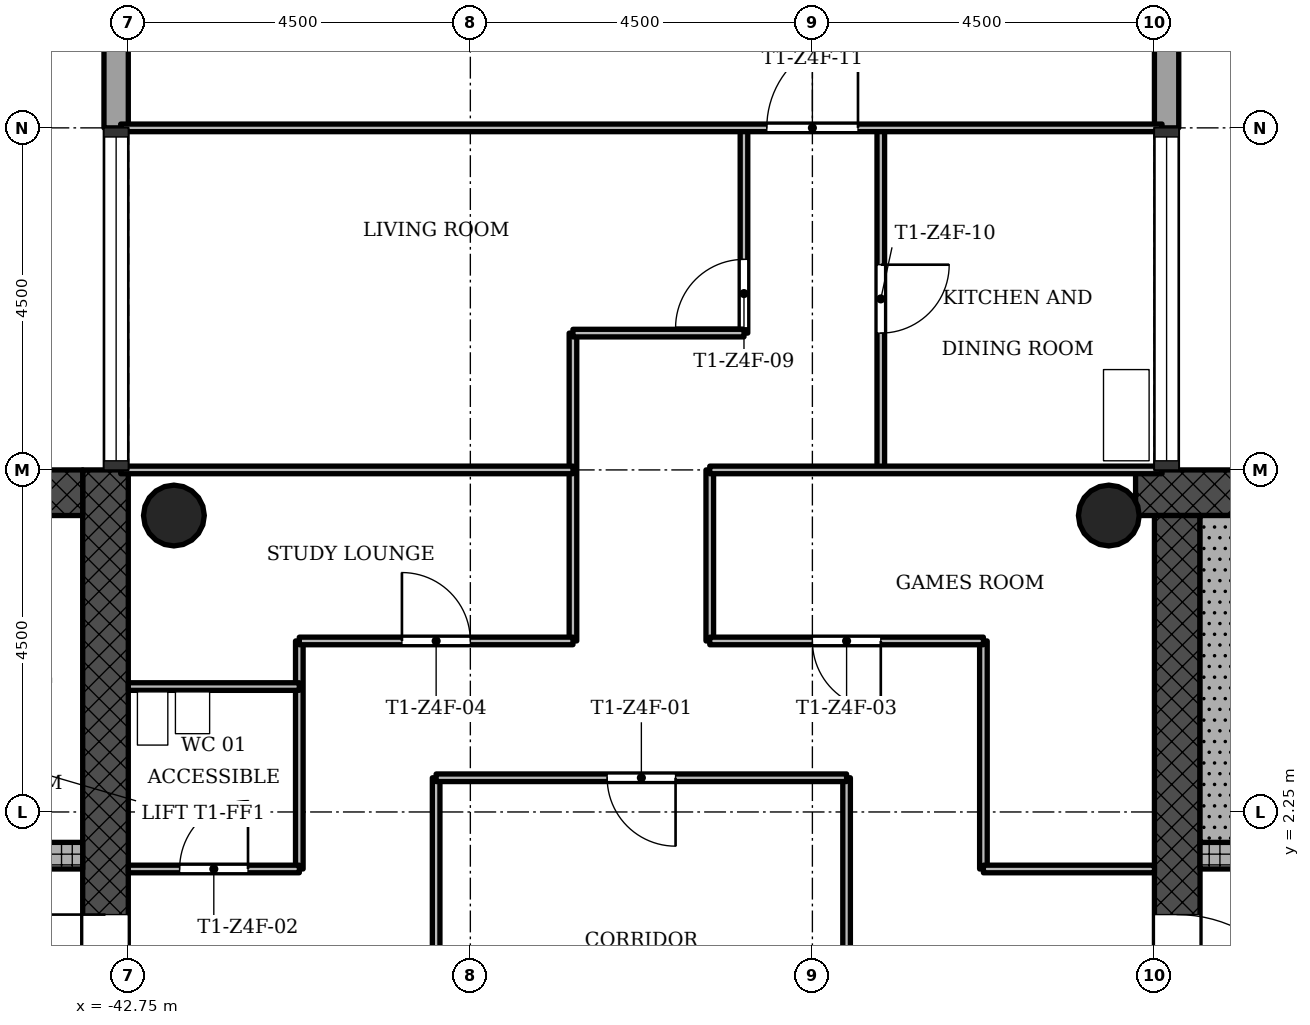
"""IFC4 building model, lengths in metres.
Left out: names, types, materials, properties, quantities, classifications, styles, units other than length and angle.
Written with IfcOpenShell. Run it as: python <this file> out.ifc"""

import sys

from ifc_helpers import new_model, si_unit, direction, frame, frame_2d, origin, origin_2d, place, context, subcontext, project, spatial, rectangle, hollow_circle, extrude, element, fill, save


model = new_model("IFC4")
c1 = context("Model", 3, precision=1e-05, world=origin(), true_north=direction((0.0, 1.0)))
c2 = subcontext(c1, "Body", "Model", "MODEL_VIEW")
j1 = project(units=[si_unit("LENGTHUNIT", "METRE"), si_unit("PLANEANGLEUNIT", "RADIAN")], contexts=[c1])
p1 = place(None, origin())
s1 = spatial("IfcSite", under=j1, at=p1, CompositionType="ELEMENT")
p2 = place(p1, origin())
s2 = spatial("IfcBuilding", under=s1, at=p2, CompositionType="ELEMENT")
p3 = place(p2, frame((0.0, 0.0, 216.4)))
s3 = spatial("IfcBuildingStorey", under=s2, at=p3, CompositionType="ELEMENT", Elevation=216.4)
p4 = place(p3, frame((-20.602, 6.45, 0.0), z_axis=(0.0, 0.0, 1.0), x_axis=(-1.0, 0.0, 0.0)))
e1 = element("IfcWall", 1, at=p4, inside=s3, PredefinedType="SHEAR", context=c2, shape_type="SweptSolid", body=[
    extrude(rectangle(XDim=8.896, YDim=0.6, at=frame_2d((4.448, 0.0))), origin(), (0.0, 0.0, 1.0), 3.4),
])
p5 = place(p3, frame((-28.95, 6.15, 0.0), z_axis=(0.0, 0.0, 1.0), x_axis=(0.0, -1.0, 0.0)))
e2 = element("IfcWall", 2, at=p5, inside=s3, PredefinedType="SHEAR", context=c2, shape_type="SweptSolid", body=[
    extrude(rectangle(XDim=12.9, YDim=0.6, at=frame_2d((6.45, 0.0))), origin(), (0.0, 0.0, 1.0), 3.4),
])
p6 = place(p5, frame((5.25, 0.0, 0.0)))
e3 = element("IfcOpeningElement", 3, at=p6, cuts=e2, PredefinedType="OPENING", context=c2, shape_type="SweptSolid", body=[
    extrude(rectangle(XDim=1.8, YDim=2.1, at=frame_2d((0.9, 1.05))), frame((0.0, 0.31, 0.0), z_axis=(0.0, -1.0, 0.0), x_axis=(1.0, 0.0, 0.0)), (0.0, 0.0, 1.0), 0.62),
])
p7 = place(p3, frame((-28.65, 1.675, 0.0), z_axis=(0.0, 0.0, 1.0), x_axis=(1.0, 0.0, 0.0)))
e4 = element("IfcWall", 4, at=p7, inside=s3, PredefinedType="SHEAR", context=c2, shape_type="SweptSolid", body=[
    extrude(rectangle(XDim=7.8, YDim=0.35, at=frame_2d((3.9, 0.0))), origin(), (0.0, 0.0, 1.0), 3.4),
])
p8 = place(p7, frame((1.05, 0.0, 0.0)))
e5 = element("IfcOpeningElement", 5, at=p8, cuts=e4, PredefinedType="OPENING", context=c2, shape_type="SweptSolid", body=[
    extrude(rectangle(XDim=0.9, YDim=2.1, at=frame_2d((0.45, 1.05))), frame((0.0, 0.185, 0.0), z_axis=(0.0, -1.0, 0.0), x_axis=(1.0, 0.0, 0.0)), (0.0, 0.0, 1.0), 0.37),
])
p9 = place(p3, frame((-43.05, -6.15, 0.0), z_axis=(0.0, 0.0, 1.0), x_axis=(0.0, 1.0, 0.0)))
e6 = element("IfcWall", 6, at=p9, inside=s3, PredefinedType="SHEAR", context=c2, shape_type="SweptSolid", body=[
    extrude(rectangle(XDim=12.9, YDim=0.6, at=frame_2d((6.45, 0.0))), origin(), (0.0, 0.0, 1.0), 3.4),
])
p10 = place(p9, frame((5.25, 0.0, 0.0)))
e7 = element("IfcOpeningElement", 7, at=p10, cuts=e6, PredefinedType="OPENING", context=c2, shape_type="SweptSolid", body=[
    extrude(rectangle(XDim=1.8, YDim=2.1, at=frame_2d((0.9, 1.05))), frame((0.0, 0.31, 0.0), z_axis=(0.0, -1.0, 0.0), x_axis=(1.0, 0.0, 0.0)), (0.0, 0.0, 1.0), 0.62),
])
p11 = place(p3, frame((-43.35, 6.45, 0.0), z_axis=(0.0, 0.0, 1.0), x_axis=(-1.0, 0.0, 0.0)))
e8 = element("IfcWall", 8, at=p11, inside=s3, PredefinedType="SHEAR", context=c2, shape_type="SweptSolid", body=[
    extrude(rectangle(XDim=8.4, YDim=0.6, at=frame_2d((4.2, 0.0))), origin(), (0.0, 0.0, 1.0), 3.4),
])
p12 = place(p3, frame((-51.15, 1.675, 0.0), z_axis=(0.0, 0.0, 1.0), x_axis=(1.0, 0.0, 0.0)))
e9 = element("IfcWall", 9, at=p12, inside=s3, PredefinedType="SHEAR", context=c2, shape_type="SweptSolid", body=[
    extrude(rectangle(XDim=7.8, YDim=0.35, at=frame_2d((3.9, 0.0))), origin(), (0.0, 0.0, 1.0), 3.4),
])
p13 = place(p12, frame((5.55, 0.0, 0.0)))
e10 = element("IfcOpeningElement", 10, at=p13, cuts=e9, PredefinedType="OPENING", context=c2, shape_type="SweptSolid", body=[
    extrude(rectangle(XDim=1.1, YDim=2.1, at=frame_2d((0.55, 1.05))), frame((0.0, 0.185, 0.0), z_axis=(0.0, -1.0, 0.0), x_axis=(1.0, 0.0, 0.0)), (0.0, 0.0, 1.0), 0.37),
])
p14 = place(p12, frame((1.2, 0.0, 0.0)))
e11 = element("IfcOpeningElement", 11, at=p14, cuts=e9, PredefinedType="OPENING", context=c2, shape_type="SweptSolid", body=[
    extrude(rectangle(XDim=1.1, YDim=2.1, at=frame_2d((0.55, 1.05))), frame((0.0, 0.185, 0.0), z_axis=(0.0, -1.0, 0.0), x_axis=(1.0, 0.0, 0.0)), (0.0, 0.0, 1.0), 0.37),
])
p15 = place(p12, frame((3.5, 0.0, 0.0)))
e12 = element("IfcOpeningElement", 12, at=p15, cuts=e9, PredefinedType="OPENING", context=c2, shape_type="SweptSolid", body=[
    extrude(rectangle(XDim=0.9, YDim=2.1, at=frame_2d((0.45, 1.05))), frame((0.0, 0.185, 0.0), z_axis=(0.0, -1.0, 0.0), x_axis=(1.0, 0.0, 0.0)), (0.0, 0.0, 1.0), 0.37),
])
for number, where, z_axis, x_axis in (
    (13, (-29.85, 6.15, 0.0), (0.0, 0.0, 1.0), (1.0, 0.0, 0.0)),
    (14, (-42.15, 6.15, 0.0), (0.0, 0.0, 1.0), (1.0, 0.0, 0.0)),
):
    element("IfcColumn", number, at=place(p3, frame(where, z_axis=z_axis, x_axis=x_axis)), inside=s3, PredefinedType="COLUMN", context=c2, shape_type="SweptSolid", body=[
        extrude(hollow_circle(Radius=0.4, WallThickness=0.028, at=origin_2d()), origin(), (0.0, 0.0, 1.0), 3.4),
    ])
p16 = place(p3, frame((-29.09, 11.25, -0.3), z_axis=(0.0, 0.0, 1.0), x_axis=(0.0, 1.0, 0.0)))
e15 = element("IfcWall", 15, at=p16, inside=s3, PredefinedType="STANDARD", context=c2, shape_type="SweptSolid", body=[
    extrude(rectangle(XDim=1.82, YDim=0.32, at=frame_2d((0.91, 0.0))), origin(), (0.0, 0.0, 1.0), 3.4),
])
p17 = place(p3, frame((-42.91, 12.75, -0.3), z_axis=(0.0, 0.0, 1.0), x_axis=(0.0, -1.0, 0.0)))
e16 = element("IfcWall", 16, at=p17, inside=s3, PredefinedType="STANDARD", context=c2, shape_type="SweptSolid", body=[
    extrude(rectangle(XDim=1.5, YDim=0.32, at=frame_2d((0.75, 0.0))), origin(), (0.0, 0.0, 1.0), 3.4),
])
p18 = place(p3, frame((-40.5, 1.5, 0.0), z_axis=(0.0, 0.0, 1.0), x_axis=(0.0, 1.0, 0.0)))
e17 = element("IfcWall", 17, at=p18, inside=s3, PredefinedType="PARTITIONING", context=c2, shape_type="SweptSolid", body=[
    extrude(rectangle(XDim=3.0, YDim=0.1, at=frame_2d((1.5, 0.0))), origin(), (0.0, 0.0, 1.0), 3.0),
])
p19 = place(p3, frame((-38.7, -2.7, 0.0), z_axis=(0.0, 0.0, 1.0), x_axis=(0.0, 1.0, 0.0)))
e18 = element("IfcWall", 18, at=p19, inside=s3, PredefinedType="PARTITIONING", context=c2, shape_type="SweptSolid", body=[
    extrude(rectangle(XDim=5.4, YDim=0.1, at=frame_2d((2.7, 0.0))), origin(), (0.0, 0.0, 1.0), 3.0),
])
p20 = place(p3, frame((-36.9, 4.5, 0.0), z_axis=(0.0, 0.0, 1.0), x_axis=(0.0, 1.0, 0.0)))
e19 = element("IfcWall", 19, at=p20, inside=s3, PredefinedType="PARTITIONING", context=c2, shape_type="SweptSolid", body=[
    extrude(rectangle(XDim=4.05, YDim=0.1, at=frame_2d((2.025, 0.0))), origin(), (0.0, 0.0, 1.0), 3.0),
])
p21 = place(p3, frame((-35.1, 4.5, 0.0), z_axis=(0.0, 0.0, 1.0), x_axis=(0.0, 1.0, 0.0)))
e20 = element("IfcWall", 20, at=p21, inside=s3, PredefinedType="PARTITIONING", context=c2, shape_type="SweptSolid", body=[
    extrude(rectangle(XDim=2.25, YDim=0.1, at=frame_2d((1.125, 0.0))), origin(), (0.0, 0.0, 1.0), 3.0),
])
p22 = place(p3, frame((-34.65, 8.55, 0.0), z_axis=(0.0, 0.0, 1.0), x_axis=(0.0, 1.0, 0.0)))
e21 = element("IfcWall", 21, at=p22, inside=s3, PredefinedType="PARTITIONING", context=c2, shape_type="SweptSolid", body=[
    extrude(rectangle(XDim=2.7, YDim=0.1, at=frame_2d((1.35, 0.0))), origin(), (0.0, 0.0, 1.0), 3.0),
])
p23 = place(p22, frame((0.07, 0.0, 0.0)))
e22 = element("IfcOpeningElement", 22, at=p23, cuts=e21, PredefinedType="OPENING", context=c2, shape_type="SweptSolid", body=[
    extrude(rectangle(XDim=0.9, YDim=2.1, at=frame_2d((0.45, 1.05))), frame((0.0, 0.06, 0.0), z_axis=(0.0, -1.0, 0.0), x_axis=(1.0, 0.0, 0.0)), (0.0, 0.0, 1.0), 0.12),
])
p24 = place(p3, frame((-33.3, -2.7, 0.0), z_axis=(0.0, 0.0, 1.0), x_axis=(0.0, 1.0, 0.0)))
e23 = element("IfcWall", 23, at=p24, inside=s3, PredefinedType="PARTITIONING", context=c2, shape_type="SweptSolid", body=[
    extrude(rectangle(XDim=5.4, YDim=0.1, at=frame_2d((2.7, 0.0))), origin(), (0.0, 0.0, 1.0), 3.0),
])
p25 = place(p3, frame((-32.85, 6.75, 0.0), z_axis=(0.0, 0.0, 1.0), x_axis=(0.0, 1.0, 0.0)))
e24 = element("IfcWall", 24, at=p25, inside=s3, PredefinedType="PARTITIONING", context=c2, shape_type="SweptSolid", body=[
    extrude(rectangle(XDim=4.5, YDim=0.1, at=frame_2d((2.25, 0.0))), origin(), (0.0, 0.0, 1.0), 3.0),
])
p26 = place(p25, frame((1.8, 0.0, 0.0)))
e25 = element("IfcOpeningElement", 25, at=p26, cuts=e24, PredefinedType="OPENING", context=c2, shape_type="SweptSolid", body=[
    extrude(rectangle(XDim=0.9, YDim=2.1, at=frame_2d((0.45, 1.05))), frame((0.0, 0.06, 0.0), z_axis=(0.0, -1.0, 0.0), x_axis=(1.0, 0.0, 0.0)), (0.0, 0.0, 1.0), 0.12),
])
p27 = place(p3, frame((-31.5, 1.5, 0.0), z_axis=(0.0, 0.0, 1.0), x_axis=(0.0, 1.0, 0.0)))
e26 = element("IfcWall", 26, at=p27, inside=s3, PredefinedType="PARTITIONING", context=c2, shape_type="SweptSolid", body=[
    extrude(rectangle(XDim=3.0, YDim=0.1, at=frame_2d((1.5, 0.0))), origin(), (0.0, 0.0, 1.0), 3.0),
])
p28 = place(p3, frame((-42.75, 1.5, 0.0), z_axis=(0.0, 0.0, 1.0), x_axis=(1.0, 0.0, 0.0)))
e27 = element("IfcWall", 27, at=p28, inside=s3, PredefinedType="PARTITIONING", context=c2, shape_type="SweptSolid", body=[
    extrude(rectangle(XDim=2.25, YDim=0.1, at=frame_2d((1.125, 0.0))), origin(), (0.0, 0.0, 1.0), 3.0),
])
p29 = place(p28, frame((0.675, 0.0, 0.0)))
e28 = element("IfcOpeningElement", 28, at=p29, cuts=e27, PredefinedType="OPENING", context=c2, shape_type="SweptSolid", body=[
    extrude(rectangle(XDim=0.9, YDim=2.1, at=frame_2d((0.45, 1.05))), frame((0.0, 0.06, 0.0), z_axis=(0.0, -1.0, 0.0), x_axis=(1.0, 0.0, 0.0)), (0.0, 0.0, 1.0), 0.12),
])
p30 = place(p3, frame((-31.5, 1.5, 0.0), z_axis=(0.0, 0.0, 1.0), x_axis=(1.0, 0.0, 0.0)))
e29 = element("IfcWall", 29, at=p30, inside=s3, PredefinedType="PARTITIONING", context=c2, shape_type="SweptSolid", body=[
    extrude(rectangle(XDim=2.25, YDim=0.1, at=frame_2d((1.125, 0.0))), origin(), (0.0, 0.0, 1.0), 3.0),
])
p31 = place(p3, frame((-38.7, 2.7, 0.0), z_axis=(0.0, 0.0, 1.0), x_axis=(1.0, 0.0, 0.0)))
e30 = element("IfcWall", 30, at=p31, inside=s3, PredefinedType="PARTITIONING", context=c2, shape_type="SweptSolid", body=[
    extrude(rectangle(XDim=5.4, YDim=0.1, at=frame_2d((2.7, 0.0))), origin(), (0.0, 0.0, 1.0), 3.0),
])
p32 = place(p31, frame((2.25, 0.0, 0.0)))
e31 = element("IfcOpeningElement", 31, at=p32, cuts=e30, PredefinedType="OPENING", context=c2, shape_type="SweptSolid", body=[
    extrude(rectangle(XDim=0.9, YDim=2.1, at=frame_2d((0.45, 1.05))), frame((0.0, 0.06, 0.0), z_axis=(0.0, -1.0, 0.0), x_axis=(1.0, 0.0, 0.0)), (0.0, 0.0, 1.0), 0.12),
])
p33 = place(p3, frame((-42.75, 3.9, 0.0), z_axis=(0.0, 0.0, 1.0), x_axis=(1.0, 0.0, 0.0)))
e32 = element("IfcWall", 32, at=p33, inside=s3, PredefinedType="PARTITIONING", context=c2, shape_type="SweptSolid", body=[
    extrude(rectangle(XDim=2.25, YDim=0.1, at=frame_2d((1.125, 0.0))), origin(), (0.0, 0.0, 1.0), 3.0),
])
p34 = place(p3, frame((-40.5, 4.5, 0.0), z_axis=(0.0, 0.0, 1.0), x_axis=(1.0, 0.0, 0.0)))
e33 = element("IfcWall", 33, at=p34, inside=s3, PredefinedType="PARTITIONING", context=c2, shape_type="SweptSolid", body=[
    extrude(rectangle(XDim=3.6, YDim=0.1, at=frame_2d((1.8, 0.0))), origin(), (0.0, 0.0, 1.0), 3.0),
])
p35 = place(p34, frame((1.35, 0.0, 0.0)))
e34 = element("IfcOpeningElement", 34, at=p35, cuts=e33, PredefinedType="OPENING", context=c2, shape_type="SweptSolid", body=[
    extrude(rectangle(XDim=0.9, YDim=2.1, at=frame_2d((0.45, 1.05))), frame((0.0, 0.06, 0.0), z_axis=(0.0, -1.0, 0.0), x_axis=(1.0, 0.0, 0.0)), (0.0, 0.0, 1.0), 0.12),
])
p36 = place(p3, frame((-35.1, 4.5, 0.0), z_axis=(0.0, 0.0, 1.0), x_axis=(1.0, 0.0, 0.0)))
e35 = element("IfcWall", 35, at=p36, inside=s3, PredefinedType="PARTITIONING", context=c2, shape_type="SweptSolid", body=[
    extrude(rectangle(XDim=3.6, YDim=0.1, at=frame_2d((1.8, 0.0))), origin(), (0.0, 0.0, 1.0), 3.0),
])
p37 = place(p36, frame((1.35, 0.0, 0.0)))
e36 = element("IfcOpeningElement", 36, at=p37, cuts=e35, PredefinedType="OPENING", context=c2, shape_type="SweptSolid", body=[
    extrude(rectangle(XDim=0.9, YDim=2.1, at=frame_2d((0.45, 1.05))), frame((0.0, 0.06, 0.0), z_axis=(0.0, -1.0, 0.0), x_axis=(1.0, 0.0, 0.0)), (0.0, 0.0, 1.0), 0.12),
])
for number, where, z_axis, x_axis in (
    (37, (-42.85, 6.75, 0.0), (0.0, 0.0, 1.0), (1.0, 0.0, 0.0)),
    (38, (-35.1, 6.75, 0.0), (0.0, 0.0, 1.0), (1.0, 0.0, 0.0)),
):
    element("IfcWall", number, at=place(p3, frame(where, z_axis=z_axis, x_axis=x_axis)), inside=s3, PredefinedType="PARTITIONING", context=c2, shape_type="SweptSolid", body=[
        extrude(rectangle(XDim=5.95, YDim=0.1, at=frame_2d((2.975, 0.0))), origin(), (0.0, 0.0, 1.0), 3.0),
    ])
p38 = place(p3, frame((-36.9, 8.55, 0.0), z_axis=(0.0, 0.0, 1.0), x_axis=(1.0, 0.0, 0.0)))
e39 = element("IfcWall", 39, at=p38, inside=s3, PredefinedType="PARTITIONING", context=c2, shape_type="SweptSolid", body=[
    extrude(rectangle(XDim=2.25, YDim=0.1, at=frame_2d((1.125, 0.0))), origin(), (0.0, 0.0, 1.0), 3.0),
])
p39 = place(p3, frame((-42.85, 11.25, 0.0), z_axis=(0.0, 0.0, 1.0), x_axis=(1.0, 0.0, 0.0)))
e40 = element("IfcWall", 40, at=p39, inside=s3, PredefinedType="PARTITIONING", context=c2, shape_type="SweptSolid", body=[
    extrude(rectangle(XDim=13.7, YDim=0.1, at=frame_2d((6.85, 0.0))), origin(), (0.0, 0.0, 1.0), 3.0),
])
p40 = place(p39, frame((8.5, 0.0, 0.0)))
e41 = element("IfcOpeningElement", 41, at=p40, cuts=e40, PredefinedType="OPENING", context=c2, shape_type="SweptSolid", body=[
    extrude(rectangle(XDim=1.2, YDim=2.1, at=frame_2d((0.6, 1.05))), frame((0.0, 0.06, 0.0), z_axis=(0.0, -1.0, 0.0), x_axis=(1.0, 0.0, 0.0)), (0.0, 0.0, 1.0), 0.12),
])
p41 = place(p3, frame((-28.35, 1.85, 0.0), z_axis=(0.0, 0.0, 1.0), x_axis=(0.0, 1.0, 0.0)))
e42 = element("IfcWall", 42, at=p41, inside=s3, PredefinedType="SHEAR", context=c2, shape_type="SweptSolid", body=[
    extrude(rectangle(XDim=4.3, YDim=0.6, at=frame_2d((2.15, 0.0))), origin(), (0.0, 0.0, 1.0), 3.4),
])
p42 = place(p32, origin())
e43 = element("IfcDoor", 43, at=p42, inside=s3, OperationType="SINGLE_SWING_RIGHT", PredefinedType="DOOR", context=c2, shape_type="SweptSolid", body=[
    extrude(rectangle(XDim=0.9, YDim=2.1, at=frame_2d((0.45, 1.05))), frame((0.0, 0.025, 0.0), z_axis=(0.0, -1.0, 0.0), x_axis=(1.0, 0.0, 0.0)), (0.0, 0.0, 1.0), 0.05),
])
fill(e31, e43)
p43 = place(p29, origin())
e44 = element("IfcDoor", 44, at=p43, inside=s3, OperationType="SINGLE_SWING_LEFT", PredefinedType="DOOR", context=c2, shape_type="SweptSolid", body=[
    extrude(rectangle(XDim=0.9, YDim=2.1, at=frame_2d((0.45, 1.05))), frame((0.0, 0.025, 0.0), z_axis=(0.0, -1.0, 0.0), x_axis=(1.0, 0.0, 0.0)), (0.0, 0.0, 1.0), 0.05),
])
fill(e28, e44)
p44 = place(p37, origin())
e45 = element("IfcDoor", 45, at=p44, inside=s3, OperationType="SINGLE_SWING_RIGHT", PredefinedType="DOOR", context=c2, shape_type="SweptSolid", body=[
    extrude(rectangle(XDim=0.9, YDim=2.1, at=frame_2d((0.45, 1.05))), frame((0.0, 0.025, 0.0), z_axis=(0.0, -1.0, 0.0), x_axis=(1.0, 0.0, 0.0)), (0.0, 0.0, 1.0), 0.05),
])
fill(e36, e45)
p45 = place(p35, origin())
e46 = element("IfcDoor", 46, at=p45, inside=s3, OperationType="SINGLE_SWING_RIGHT", PredefinedType="DOOR", context=c2, shape_type="SweptSolid", body=[
    extrude(rectangle(XDim=0.9, YDim=2.1, at=frame_2d((0.45, 1.05))), frame((0.0, 0.025, 0.0), z_axis=(0.0, -1.0, 0.0), x_axis=(1.0, 0.0, 0.0)), (0.0, 0.0, 1.0), 0.05),
])
fill(e34, e46)
p46 = place(p23, origin())
e47 = element("IfcDoor", 47, at=p46, inside=s3, OperationType="SINGLE_SWING_RIGHT", PredefinedType="DOOR", context=c2, shape_type="SweptSolid", body=[
    extrude(rectangle(XDim=0.9, YDim=2.1, at=frame_2d((0.45, 1.05))), frame((0.0, 0.025, 0.0), z_axis=(0.0, -1.0, 0.0), x_axis=(1.0, 0.0, 0.0)), (0.0, 0.0, 1.0), 0.05),
])
fill(e22, e47)
p47 = place(p26, origin())
e48 = element("IfcDoor", 48, at=p47, inside=s3, OperationType="SINGLE_SWING_RIGHT", PredefinedType="DOOR", context=c2, shape_type="SweptSolid", body=[
    extrude(rectangle(XDim=0.9, YDim=2.1, at=frame_2d((0.45, 1.05))), frame((0.0, 0.025, 0.0), z_axis=(0.0, -1.0, 0.0), x_axis=(1.0, 0.0, 0.0)), (0.0, 0.0, 1.0), 0.05),
])
fill(e25, e48)
p48 = place(p40, origin())
e49 = element("IfcDoor", 49, at=p48, inside=s3, OperationType="SINGLE_SWING_LEFT", PredefinedType="DOOR", context=c2, shape_type="SweptSolid", body=[
    extrude(rectangle(XDim=1.2, YDim=2.1, at=frame_2d((0.6, 1.05))), frame((0.0, 0.025, 0.0), z_axis=(0.0, -1.0, 0.0), x_axis=(1.0, 0.0, 0.0)), (0.0, 0.0, 1.0), 0.05),
])
fill(e41, e49)
p49 = place(p6, origin())
e50 = element("IfcDoor", 50, at=p49, inside=s3, OperationType="SINGLE_SWING_LEFT", PredefinedType="DOOR", context=c2, shape_type="SweptSolid", body=[
    extrude(rectangle(XDim=1.8, YDim=2.1, at=frame_2d((0.9, 1.05))), frame((0.0, 0.025, 0.0), z_axis=(0.0, -1.0, 0.0), x_axis=(1.0, 0.0, 0.0)), (0.0, 0.0, 1.0), 0.05),
])
fill(e3, e50)
p50 = place(p10, origin())
e51 = element("IfcDoor", 51, at=p50, inside=s3, OperationType="SINGLE_SWING_LEFT", PredefinedType="DOOR", context=c2, shape_type="SweptSolid", body=[
    extrude(rectangle(XDim=1.8, YDim=2.1, at=frame_2d((0.9, 1.05))), frame((0.0, 0.025, 0.0), z_axis=(0.0, -1.0, 0.0), x_axis=(1.0, 0.0, 0.0)), (0.0, 0.0, 1.0), 0.05),
])
fill(e7, e51)
save(model, sys.argv[1])
